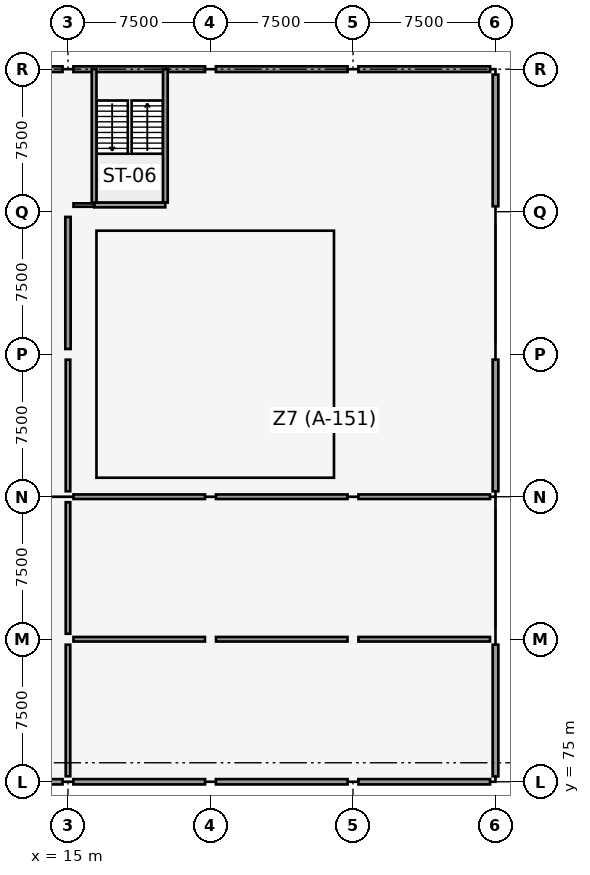
"""IFC4 building model, lengths in metres.
Left out: names, types, materials, properties, quantities, classifications, styles, units other than length and angle.
Written with IfcOpenShell. Run it as: python <this file> out.ifc"""

import sys

from ifc_helpers import new_model, si_unit, direction, frame, frame_2d, origin, origin_2d, place, context, subcontext, project, spatial, rectangle, extrude, element, fill, save


model = new_model("IFC4")
c1 = context("Model", 3, precision=1e-05, world=origin(), true_north=direction((0.0, 1.0)))
c2 = subcontext(c1, "Body", "Model", "MODEL_VIEW")
j1 = project(units=[si_unit("LENGTHUNIT", "METRE"), si_unit("PLANEANGLEUNIT", "RADIAN")], contexts=[c1])
p1 = place(None, origin())
s1 = spatial("IfcSite", under=j1, at=p1, CompositionType="ELEMENT")
p2 = place(p1, origin())
s2 = spatial("IfcBuilding", under=s1, at=p2, CompositionType="ELEMENT")
p3 = place(p2, frame((0.0, 0.0, 13.2)))
s3 = spatial("IfcBuildingStorey", under=s2, at=p3, CompositionType="ELEMENT", Elevation=13.2)
for number, where, z_axis, x_axis in (
    (1, (15.0, 75.0, 0.0), (0.0, 0.0, 1.0), (1.0, 0.0, 0.0)),
    (2, (15.0, 82.5, 0.0), (0.0, 0.0, 1.0), (1.0, 0.0, 0.0)),
    (3, (15.0, 90.0, 0.0), (0.0, 0.0, 1.0), (1.0, 0.0, 0.0)),
    (4, (15.0, 97.5, 0.0), (0.0, 0.0, 1.0), (1.0, 0.0, 0.0)),
    (5, (15.0, 105.0, 0.0), (0.0, 0.0, 1.0), (1.0, 0.0, 0.0)),
    (6, (15.0, 112.5, 0.0), (0.0, 0.0, 1.0), (1.0, 0.0, 0.0)),
    (7, (22.5, 75.0, 0.0), (0.0, 0.0, 1.0), (1.0, 0.0, 0.0)),
    (8, (22.5, 82.5, 0.0), (0.0, 0.0, 1.0), (1.0, 0.0, 0.0)),
    (9, (22.5, 90.0, 0.0), (0.0, 0.0, 1.0), (1.0, 0.0, 0.0)),
    (10, (22.5, 97.5, 0.0), (0.0, 0.0, 1.0), (1.0, 0.0, 0.0)),
    (11, (22.5, 105.0, 0.0), (0.0, 0.0, 1.0), (1.0, 0.0, 0.0)),
    (12, (22.5, 112.5, 0.0), (0.0, 0.0, 1.0), (1.0, 0.0, 0.0)),
    (13, (30.0, 75.0, 0.0), (0.0, 0.0, 1.0), (1.0, 0.0, 0.0)),
    (14, (30.0, 82.5, 0.0), (0.0, 0.0, 1.0), (1.0, 0.0, 0.0)),
    (15, (30.0, 90.0, 0.0), (0.0, 0.0, 1.0), (1.0, 0.0, 0.0)),
    (16, (30.0, 97.5, 0.0), (0.0, 0.0, 1.0), (1.0, 0.0, 0.0)),
    (17, (30.0, 105.0, 0.0), (0.0, 0.0, 1.0), (1.0, 0.0, 0.0)),
    (18, (30.0, 112.5, 0.0), (0.0, 0.0, 1.0), (1.0, 0.0, 0.0)),
    (19, (37.5, 75.0, 0.0), (0.0, 0.0, 1.0), (1.0, 0.0, 0.0)),
    (20, (37.5, 82.5, 0.0), (0.0, 0.0, 1.0), (1.0, 0.0, 0.0)),
    (21, (37.5, 90.0, 0.0), (0.0, 0.0, 1.0), (1.0, 0.0, 0.0)),
    (22, (37.5, 97.5, 0.0), (0.0, 0.0, 1.0), (1.0, 0.0, 0.0)),
    (23, (37.5, 105.0, 0.0), (0.0, 0.0, 1.0), (1.0, 0.0, 0.0)),
    (24, (37.5, 112.5, 0.0), (0.0, 0.0, 1.0), (1.0, 0.0, 0.0)),
):
    element("IfcColumn", number, at=place(p3, frame(where, z_axis=z_axis, x_axis=x_axis)), inside=s3, PredefinedType="COLUMN", context=c2, shape_type="SweptSolid", body=[
        extrude(rectangle(XDim=0.55, YDim=0.55, at=origin_2d()), origin(), (0.0, 0.0, 1.0), 3.9),
    ])
p4 = place(p3, frame((15.0, 97.775, 0.0), z_axis=(0.0, 0.0, 1.0), x_axis=(0.0, 1.0, 0.0)))
e25 = element("IfcWall", 25, at=p4, inside=s3, PredefinedType="SHEAR", context=c2, shape_type="SweptSolid", body=[
    extrude(rectangle(XDim=6.95, YDim=0.28, at=frame_2d((3.475, 0.0))), origin(), (0.0, 0.0, 1.0), 3.6),
])
p5 = place(p3, frame((8.12, 112.5, 0.0), z_axis=(0.0, 0.0, 1.0), x_axis=(1.0, 0.0, 0.0)))
e26 = element("IfcWall", 26, at=p5, inside=s3, PredefinedType="SOLIDWALL", context=c2, shape_type="SweptSolid", body=[
    extrude(rectangle(XDim=6.595, YDim=0.3, at=frame_2d((3.297, 0.0))), origin(), (0.0, 0.0, 1.0), 2.59),
])
p6 = place(p5, frame((2.055, 0.0, 0.6)))
e27 = element("IfcOpeningElement", 27, at=p6, cuts=e26, PredefinedType="OPENING", context=c2, shape_type="SweptSolid", body=[
    extrude(rectangle(XDim=2.15, YDim=1.45, at=frame_2d((1.075, 0.725))), frame((0.0, 0.16, 0.0), z_axis=(0.0, -1.0, 0.0), x_axis=(1.0, 0.0, 0.0)), (0.0, 0.0, 1.0), 0.32),
])
p7 = place(p3, frame((8.12, 75.0, 0.0), z_axis=(0.0, 0.0, 1.0), x_axis=(1.0, 0.0, 0.0)))
e28 = element("IfcWall", 28, at=p7, inside=s3, PredefinedType="SOLIDWALL", context=c2, shape_type="SweptSolid", body=[
    extrude(rectangle(XDim=6.595, YDim=0.28, at=frame_2d((3.297, 0.0))), origin(), (0.0, 0.0, 1.0), 2.59),
])
p8 = place(p7, frame((2.205, 0.0, 0.6)))
e29 = element("IfcOpeningElement", 29, at=p8, cuts=e28, PredefinedType="OPENING", context=c2, shape_type="SweptSolid", body=[
    extrude(rectangle(XDim=1.85, YDim=1.8, at=frame_2d((0.925, 0.9))), frame((0.0, 0.15, 0.0), z_axis=(0.0, -1.0, 0.0), x_axis=(1.0, 0.0, 0.0)), (0.0, 0.0, 1.0), 0.3),
])
p9 = place(p3, frame((15.285, 112.5, 0.0), z_axis=(0.0, 0.0, 1.0), x_axis=(1.0, 0.0, 0.0)))
e30 = element("IfcWall", 30, at=p9, inside=s3, PredefinedType="SOLIDWALL", context=c2, shape_type="SweptSolid", body=[
    extrude(rectangle(XDim=6.93, YDim=0.3, at=frame_2d((3.465, 0.0))), origin(), (0.0, 0.0, 1.0), 2.59),
])
p10 = place(p3, frame((15.285, 75.0, 0.0), z_axis=(0.0, 0.0, 1.0), x_axis=(1.0, 0.0, 0.0)))
e31 = element("IfcWall", 31, at=p10, inside=s3, PredefinedType="SOLIDWALL", context=c2, shape_type="SweptSolid", body=[
    extrude(rectangle(XDim=6.93, YDim=0.28, at=frame_2d((3.465, 0.0))), origin(), (0.0, 0.0, 1.0), 2.59),
])
p11 = place(p10, frame((2.465, 0.0, 0.6)))
e32 = element("IfcOpeningElement", 32, at=p11, cuts=e31, PredefinedType="OPENING", context=c2, shape_type="SweptSolid", body=[
    extrude(rectangle(XDim=2.0, YDim=1.45, at=frame_2d((1.0, 0.725))), frame((0.0, 0.15, 0.0), z_axis=(0.0, -1.0, 0.0), x_axis=(1.0, 0.0, 0.0)), (0.0, 0.0, 1.0), 0.3),
])
p12 = place(p3, frame((22.785, 112.5, 0.0), z_axis=(0.0, 0.0, 1.0), x_axis=(1.0, 0.0, 0.0)))
e33 = element("IfcWall", 33, at=p12, inside=s3, PredefinedType="SOLIDWALL", context=c2, shape_type="SweptSolid", body=[
    extrude(rectangle(XDim=6.93, YDim=0.3, at=frame_2d((3.465, 0.0))), origin(), (0.0, 0.0, 1.0), 2.84),
])
p13 = place(p12, frame((2.815, 0.0, 0.6)))
e34 = element("IfcOpeningElement", 34, at=p13, cuts=e33, PredefinedType="OPENING", context=c2, shape_type="SweptSolid", body=[
    extrude(rectangle(XDim=1.3, YDim=1.3, at=frame_2d((0.65, 0.65))), frame((0.0, 0.16, 0.0), z_axis=(0.0, -1.0, 0.0), x_axis=(1.0, 0.0, 0.0)), (0.0, 0.0, 1.0), 0.32),
])
p14 = place(p3, frame((22.785, 75.0, 0.0), z_axis=(0.0, 0.0, 1.0), x_axis=(1.0, 0.0, 0.0)))
e35 = element("IfcWall", 35, at=p14, inside=s3, PredefinedType="SOLIDWALL", context=c2, shape_type="SweptSolid", body=[
    extrude(rectangle(XDim=6.93, YDim=0.28, at=frame_2d((3.465, 0.0))), origin(), (0.0, 0.0, 1.0), 2.84),
])
p15 = place(p14, frame((2.39, 0.0, 0.6)))
e36 = element("IfcOpeningElement", 36, at=p15, cuts=e35, PredefinedType="OPENING", context=c2, shape_type="SweptSolid", body=[
    extrude(rectangle(XDim=2.15, YDim=1.45, at=frame_2d((1.075, 0.725))), frame((0.0, 0.15, 0.0), z_axis=(0.0, -1.0, 0.0), x_axis=(1.0, 0.0, 0.0)), (0.0, 0.0, 1.0), 0.3),
])
p16 = place(p3, frame((30.285, 112.5, 0.0), z_axis=(0.0, 0.0, 1.0), x_axis=(1.0, 0.0, 0.0)))
e37 = element("IfcWall", 37, at=p16, inside=s3, PredefinedType="SOLIDWALL", context=c2, shape_type="SweptSolid", body=[
    extrude(rectangle(XDim=6.93, YDim=0.3, at=frame_2d((3.465, 0.0))), origin(), (0.0, 0.0, 1.0), 2.84),
])
p17 = place(p16, frame((2.74, 0.0, 0.6)))
e38 = element("IfcOpeningElement", 38, at=p17, cuts=e37, PredefinedType="OPENING", context=c2, shape_type="SweptSolid", body=[
    extrude(rectangle(XDim=1.45, YDim=1.3, at=frame_2d((0.725, 0.65))), frame((0.0, 0.16, 0.0), z_axis=(0.0, -1.0, 0.0), x_axis=(1.0, 0.0, 0.0)), (0.0, 0.0, 1.0), 0.32),
])
p18 = place(p3, frame((30.285, 75.0, 0.0), z_axis=(0.0, 0.0, 1.0), x_axis=(1.0, 0.0, 0.0)))
e39 = element("IfcWall", 39, at=p18, inside=s3, PredefinedType="SOLIDWALL", context=c2, shape_type="SweptSolid", body=[
    extrude(rectangle(XDim=6.93, YDim=0.28, at=frame_2d((3.465, 0.0))), origin(), (0.0, 0.0, 1.0), 2.84),
])
p19 = place(p18, frame((2.89, 0.0, 0.6)))
e40 = element("IfcOpeningElement", 40, at=p19, cuts=e39, PredefinedType="OPENING", context=c2, shape_type="SweptSolid", body=[
    extrude(rectangle(XDim=1.15, YDim=1.3, at=frame_2d((0.575, 0.65))), frame((0.0, 0.15, 0.0), z_axis=(0.0, -1.0, 0.0), x_axis=(1.0, 0.0, 0.0)), (0.0, 0.0, 1.0), 0.3),
])
p20 = place(p3, frame((37.5, 75.285, 0.0), z_axis=(0.0, 0.0, 1.0), x_axis=(0.0, 1.0, 0.0)))
e41 = element("IfcWall", 41, at=p20, inside=s3, PredefinedType="SOLIDWALL", context=c2, shape_type="SweptSolid", body=[
    extrude(rectangle(XDim=6.93, YDim=0.3, at=frame_2d((3.465, 0.0))), origin(), (0.0, 0.0, 1.0), 2.54),
])
p21 = place(p20, frame((2.415, 0.0, 0.6)))
e42 = element("IfcOpeningElement", 42, at=p21, cuts=e41, PredefinedType="OPENING", context=c2, shape_type="SweptSolid", body=[
    extrude(rectangle(XDim=2.1, YDim=1.3, at=frame_2d((1.05, 0.65))), frame((0.0, 0.16, 0.0), z_axis=(0.0, -1.0, 0.0), x_axis=(1.0, 0.0, 0.0)), (0.0, 0.0, 1.0), 0.32),
])
p22 = place(p3, frame((37.5, 90.285, 0.0), z_axis=(0.0, 0.0, 1.0), x_axis=(0.0, 1.0, 0.0)))
e43 = element("IfcWall", 43, at=p22, inside=s3, PredefinedType="SOLIDWALL", context=c2, shape_type="SweptSolid", body=[
    extrude(rectangle(XDim=6.93, YDim=0.3, at=frame_2d((3.465, 0.0))), origin(), (0.0, 0.0, 1.0), 2.64),
])
p23 = place(p22, frame((2.865, 0.0, 0.6)))
e44 = element("IfcOpeningElement", 44, at=p23, cuts=e43, PredefinedType="OPENING", context=c2, shape_type="SweptSolid", body=[
    extrude(rectangle(XDim=1.2, YDim=1.2, at=frame_2d((0.6, 0.6))), frame((0.0, 0.16, 0.0), z_axis=(0.0, -1.0, 0.0), x_axis=(1.0, 0.0, 0.0)), (0.0, 0.0, 1.0), 0.32),
])
p24 = place(p3, frame((37.5, 105.285, 0.0), z_axis=(0.0, 0.0, 1.0), x_axis=(0.0, 1.0, 0.0)))
e45 = element("IfcWall", 45, at=p24, inside=s3, PredefinedType="SOLIDWALL", context=c2, shape_type="SweptSolid", body=[
    extrude(rectangle(XDim=6.93, YDim=0.3, at=frame_2d((3.465, 0.0))), origin(), (0.0, 0.0, 1.0), 2.79),
])
p25 = place(p24, frame((2.565, 0.0, 0.6)))
e46 = element("IfcOpeningElement", 46, at=p25, cuts=e45, PredefinedType="OPENING", context=c2, shape_type="SweptSolid", body=[
    extrude(rectangle(XDim=1.8, YDim=1.2, at=frame_2d((0.9, 0.6))), frame((0.0, 0.16, 0.0), z_axis=(0.0, -1.0, 0.0), x_axis=(1.0, 0.0, 0.0)), (0.0, 0.0, 1.0), 0.32),
])
p26 = place(p3, frame((16.38, 105.355, 0.0), z_axis=(0.0, 0.0, 1.0), x_axis=(1.0, 0.0, 0.0)))
e47 = element("IfcWall", 47, at=p26, inside=s3, PredefinedType="SOLIDWALL", context=c2, shape_type="SweptSolid", body=[
    extrude(rectangle(XDim=3.74, YDim=0.25, at=frame_2d((1.87, 0.0))), origin(), (0.0, 0.0, 1.0), 3.62),
])
p27 = place(p3, frame((16.375, 105.48, 0.0), z_axis=(0.0, 0.0, 1.0), x_axis=(0.0, 1.0, 0.0)))
e48 = element("IfcWall", 48, at=p27, inside=s3, PredefinedType="SOLIDWALL", context=c2, shape_type="SweptSolid", body=[
    extrude(rectangle(XDim=7.02, YDim=0.25, at=frame_2d((3.51, 0.0))), origin(), (0.0, 0.0, 1.0), 3.62),
])
p28 = place(p27, frame((5.47, 0.0, 0.0)))
e49 = element("IfcOpeningElement", 49, at=p28, cuts=e48, PredefinedType="OPENING", context=c2, shape_type="SweptSolid", body=[
    extrude(rectangle(XDim=1.1, YDim=2.15, at=frame_2d((0.55, 1.075))), frame((0.0, 0.135, 0.0), z_axis=(0.0, -1.0, 0.0), x_axis=(1.0, 0.0, 0.0)), (0.0, 0.0, 1.0), 0.27),
])
p29 = place(p3, frame((20.125, 105.48, 0.0), z_axis=(0.0, 0.0, 1.0), x_axis=(0.0, 1.0, 0.0)))
e50 = element("IfcWall", 50, at=p29, inside=s3, PredefinedType="SOLIDWALL", context=c2, shape_type="SweptSolid", body=[
    extrude(rectangle(XDim=7.02, YDim=0.25, at=frame_2d((3.51, 0.0))), origin(), (0.0, 0.0, 1.0), 3.62),
])
p30 = place(p3, frame((15.289, 105.35, 0.0), z_axis=(0.0, 0.0, 1.0), x_axis=(1.0, 0.0, 0.0)))
e51 = element("IfcWall", 51, at=p30, inside=s3, PredefinedType="PARTITIONING", context=c2, shape_type="SweptSolid", body=[
    extrude(rectangle(XDim=1.091, YDim=0.18, at=frame_2d((0.545, 0.0))), origin(), (0.0, 0.0, 1.0), 2.54),
])
p31 = place(p3, frame((15.289, 82.5, 0.0), z_axis=(0.0, 0.0, 1.0), x_axis=(1.0, 0.0, 0.0)))
e52 = element("IfcWall", 52, at=p31, inside=s3, PredefinedType="PARTITIONING", context=c2, shape_type="SweptSolid", body=[
    extrude(rectangle(XDim=6.922, YDim=0.24, at=frame_2d((3.461, 0.0))), origin(), (0.0, 0.0, 1.0), 2.59),
])
for number, where, z_axis, x_axis in (
    (53, (22.789, 82.5, 0.0), (0.0, 0.0, 1.0), (1.0, 0.0, 0.0)),
    (54, (30.289, 82.5, 0.0), (0.0, 0.0, 1.0), (1.0, 0.0, 0.0)),
    (55, (15.289, 90.0, 0.0), (0.0, 0.0, 1.0), (1.0, 0.0, 0.0)),
    (56, (22.789, 90.0, 0.0), (0.0, 0.0, 1.0), (1.0, 0.0, 0.0)),
    (57, (30.289, 90.0, 0.0), (0.0, 0.0, 1.0), (1.0, 0.0, 0.0)),
):
    element("IfcWall", number, at=place(p3, frame(where, z_axis=z_axis, x_axis=x_axis)), inside=s3, PredefinedType="PARTITIONING", context=c2, shape_type="SweptSolid", body=[
        extrude(rectangle(XDim=6.922, YDim=0.24, at=frame_2d((3.461, 0.0))), origin(), (0.0, 0.0, 1.0), 2.54),
    ])
p32 = place(p3, frame((15.0, 75.289, 0.0), z_axis=(0.0, 0.0, 1.0), x_axis=(0.0, 1.0, 0.0)))
e58 = element("IfcWall", 58, at=p32, inside=s3, PredefinedType="PARTITIONING", context=c2, shape_type="SweptSolid", body=[
    extrude(rectangle(XDim=6.922, YDim=0.24, at=frame_2d((3.461, 0.0))), origin(), (0.0, 0.0, 1.0), 2.59),
])
p33 = place(p32, frame((2.761, 0.0, 0.0)))
e59 = element("IfcOpeningElement", 59, at=p33, cuts=e58, PredefinedType="OPENING", context=c2, shape_type="SweptSolid", body=[
    extrude(rectangle(XDim=1.4, YDim=2.14, at=frame_2d((0.7, 1.07))), frame((0.0, 0.13, 0.0), z_axis=(0.0, -1.0, 0.0), x_axis=(1.0, 0.0, 0.0)), (0.0, 0.0, 1.0), 0.26),
])
p34 = place(p3, frame((15.0, 82.789, 0.0), z_axis=(0.0, 0.0, 1.0), x_axis=(0.0, 1.0, 0.0)))
e60 = element("IfcWall", 60, at=p34, inside=s3, PredefinedType="PARTITIONING", context=c2, shape_type="SweptSolid", body=[
    extrude(rectangle(XDim=6.922, YDim=0.24, at=frame_2d((3.461, 0.0))), origin(), (0.0, 0.0, 1.0), 2.59),
])
p35 = place(p34, frame((2.761, 0.0, 0.0)))
e61 = element("IfcOpeningElement", 61, at=p35, cuts=e60, PredefinedType="OPENING", context=c2, shape_type="SweptSolid", body=[
    extrude(rectangle(XDim=1.4, YDim=2.14, at=frame_2d((0.7, 1.07))), frame((0.0, 0.13, 0.0), z_axis=(0.0, -1.0, 0.0), x_axis=(1.0, 0.0, 0.0)), (0.0, 0.0, 1.0), 0.26),
])
p36 = place(p3, frame((15.0, 90.289, 0.0), z_axis=(0.0, 0.0, 1.0), x_axis=(0.0, 1.0, 0.0)))
e62 = element("IfcWall", 62, at=p36, inside=s3, PredefinedType="PARTITIONING", context=c2, shape_type="SweptSolid", body=[
    extrude(rectangle(XDim=6.922, YDim=0.24, at=frame_2d((3.461, 0.0))), origin(), (0.0, 0.0, 1.0), 2.59),
])
p37 = place(p36, frame((2.761, 0.0, 0.0)))
e63 = element("IfcOpeningElement", 63, at=p37, cuts=e62, PredefinedType="OPENING", context=c2, shape_type="SweptSolid", body=[
    extrude(rectangle(XDim=1.4, YDim=2.14, at=frame_2d((0.7, 1.07))), frame((0.0, 0.13, 0.0), z_axis=(0.0, -1.0, 0.0), x_axis=(1.0, 0.0, 0.0)), (0.0, 0.0, 1.0), 0.26),
])
p38 = place(p11, origin())
e64 = element("IfcWindow", 64, at=p38, inside=s3, PartitioningType="SINGLE_PANEL", PredefinedType="WINDOW", context=c2, shape_type="SweptSolid", body=[
    extrude(rectangle(XDim=2.0, YDim=1.45, at=frame_2d((1.0, 0.725))), frame((0.0, 0.03, 0.0), z_axis=(0.0, -1.0, 0.0), x_axis=(1.0, 0.0, 0.0)), (0.0, 0.0, 1.0), 0.06),
])
fill(e32, e64)
p39 = place(p13, origin())
e65 = element("IfcWindow", 65, at=p39, inside=s3, PartitioningType="SINGLE_PANEL", PredefinedType="WINDOW", context=c2, shape_type="SweptSolid", body=[
    extrude(rectangle(XDim=1.3, YDim=1.3, at=frame_2d((0.65, 0.65))), frame((0.0, 0.03, 0.0), z_axis=(0.0, -1.0, 0.0), x_axis=(1.0, 0.0, 0.0)), (0.0, 0.0, 1.0), 0.06),
])
fill(e34, e65)
p40 = place(p15, origin())
e66 = element("IfcWindow", 66, at=p40, inside=s3, PartitioningType="SINGLE_PANEL", PredefinedType="WINDOW", context=c2, shape_type="SweptSolid", body=[
    extrude(rectangle(XDim=2.15, YDim=1.45, at=frame_2d((1.075, 0.725))), frame((0.0, 0.03, 0.0), z_axis=(0.0, -1.0, 0.0), x_axis=(1.0, 0.0, 0.0)), (0.0, 0.0, 1.0), 0.06),
])
fill(e36, e66)
p41 = place(p17, origin())
e67 = element("IfcWindow", 67, at=p41, inside=s3, PartitioningType="SINGLE_PANEL", PredefinedType="WINDOW", context=c2, shape_type="SweptSolid", body=[
    extrude(rectangle(XDim=1.45, YDim=1.3, at=frame_2d((0.725, 0.65))), frame((0.0, 0.03, 0.0), z_axis=(0.0, -1.0, 0.0), x_axis=(1.0, 0.0, 0.0)), (0.0, 0.0, 1.0), 0.06),
])
fill(e38, e67)
p42 = place(p19, origin())
e68 = element("IfcWindow", 68, at=p42, inside=s3, PartitioningType="SINGLE_PANEL", PredefinedType="WINDOW", context=c2, shape_type="SweptSolid", body=[
    extrude(rectangle(XDim=1.15, YDim=1.3, at=frame_2d((0.575, 0.65))), frame((0.0, 0.03, 0.0), z_axis=(0.0, -1.0, 0.0), x_axis=(1.0, 0.0, 0.0)), (0.0, 0.0, 1.0), 0.06),
])
fill(e40, e68)
p43 = place(p21, origin())
e69 = element("IfcWindow", 69, at=p43, inside=s3, PartitioningType="SINGLE_PANEL", PredefinedType="WINDOW", context=c2, shape_type="SweptSolid", body=[
    extrude(rectangle(XDim=2.1, YDim=1.3, at=frame_2d((1.05, 0.65))), frame((0.0, 0.03, 0.0), z_axis=(0.0, -1.0, 0.0), x_axis=(1.0, 0.0, 0.0)), (0.0, 0.0, 1.0), 0.06),
])
fill(e42, e69)
p44 = place(p23, origin())
e70 = element("IfcWindow", 70, at=p44, inside=s3, PartitioningType="SINGLE_PANEL", PredefinedType="WINDOW", context=c2, shape_type="SweptSolid", body=[
    extrude(rectangle(XDim=1.2, YDim=1.2, at=frame_2d((0.6, 0.6))), frame((0.0, 0.03, 0.0), z_axis=(0.0, -1.0, 0.0), x_axis=(1.0, 0.0, 0.0)), (0.0, 0.0, 1.0), 0.06),
])
fill(e44, e70)
p45 = place(p25, origin())
e71 = element("IfcWindow", 71, at=p45, inside=s3, PartitioningType="SINGLE_PANEL", PredefinedType="WINDOW", context=c2, shape_type="SweptSolid", body=[
    extrude(rectangle(XDim=1.8, YDim=1.2, at=frame_2d((0.9, 0.6))), frame((0.0, 0.03, 0.0), z_axis=(0.0, -1.0, 0.0), x_axis=(1.0, 0.0, 0.0)), (0.0, 0.0, 1.0), 0.06),
])
fill(e46, e71)
p46 = place(p28, origin())
e72 = element("IfcDoor", 72, at=p46, inside=s3, OperationType="SINGLE_SWING_RIGHT", PredefinedType="DOOR", context=c2, shape_type="SweptSolid", body=[
    extrude(rectangle(XDim=1.1, YDim=2.15, at=frame_2d((0.55, 1.075))), frame((0.0, 0.025, 0.0), z_axis=(0.0, -1.0, 0.0), x_axis=(1.0, 0.0, 0.0)), (0.0, 0.0, 1.0), 0.05),
])
fill(e49, e72)
p47 = place(p33, origin())
e73 = element("IfcDoor", 73, at=p47, inside=s3, OperationType="SINGLE_SWING_RIGHT", PredefinedType="DOOR", context=c2, shape_type="SweptSolid", body=[
    extrude(rectangle(XDim=1.4, YDim=2.14, at=frame_2d((0.7, 1.07))), frame((0.0, 0.025, 0.0), z_axis=(0.0, -1.0, 0.0), x_axis=(1.0, 0.0, 0.0)), (0.0, 0.0, 1.0), 0.05),
])
fill(e59, e73)
p48 = place(p35, origin())
e74 = element("IfcDoor", 74, at=p48, inside=s3, OperationType="SINGLE_SWING_LEFT", PredefinedType="DOOR", context=c2, shape_type="SweptSolid", body=[
    extrude(rectangle(XDim=1.4, YDim=2.14, at=frame_2d((0.7, 1.07))), frame((0.0, 0.025, 0.0), z_axis=(0.0, -1.0, 0.0), x_axis=(1.0, 0.0, 0.0)), (0.0, 0.0, 1.0), 0.05),
])
fill(e61, e74)
p49 = place(p37, origin())
e75 = element("IfcDoor", 75, at=p49, inside=s3, OperationType="SINGLE_SWING_RIGHT", PredefinedType="DOOR", context=c2, shape_type="SweptSolid", body=[
    extrude(rectangle(XDim=1.4, YDim=2.14, at=frame_2d((0.7, 1.07))), frame((0.0, 0.025, 0.0), z_axis=(0.0, -1.0, 0.0), x_axis=(1.0, 0.0, 0.0)), (0.0, 0.0, 1.0), 0.05),
])
fill(e63, e75)
save(model, sys.argv[1])
